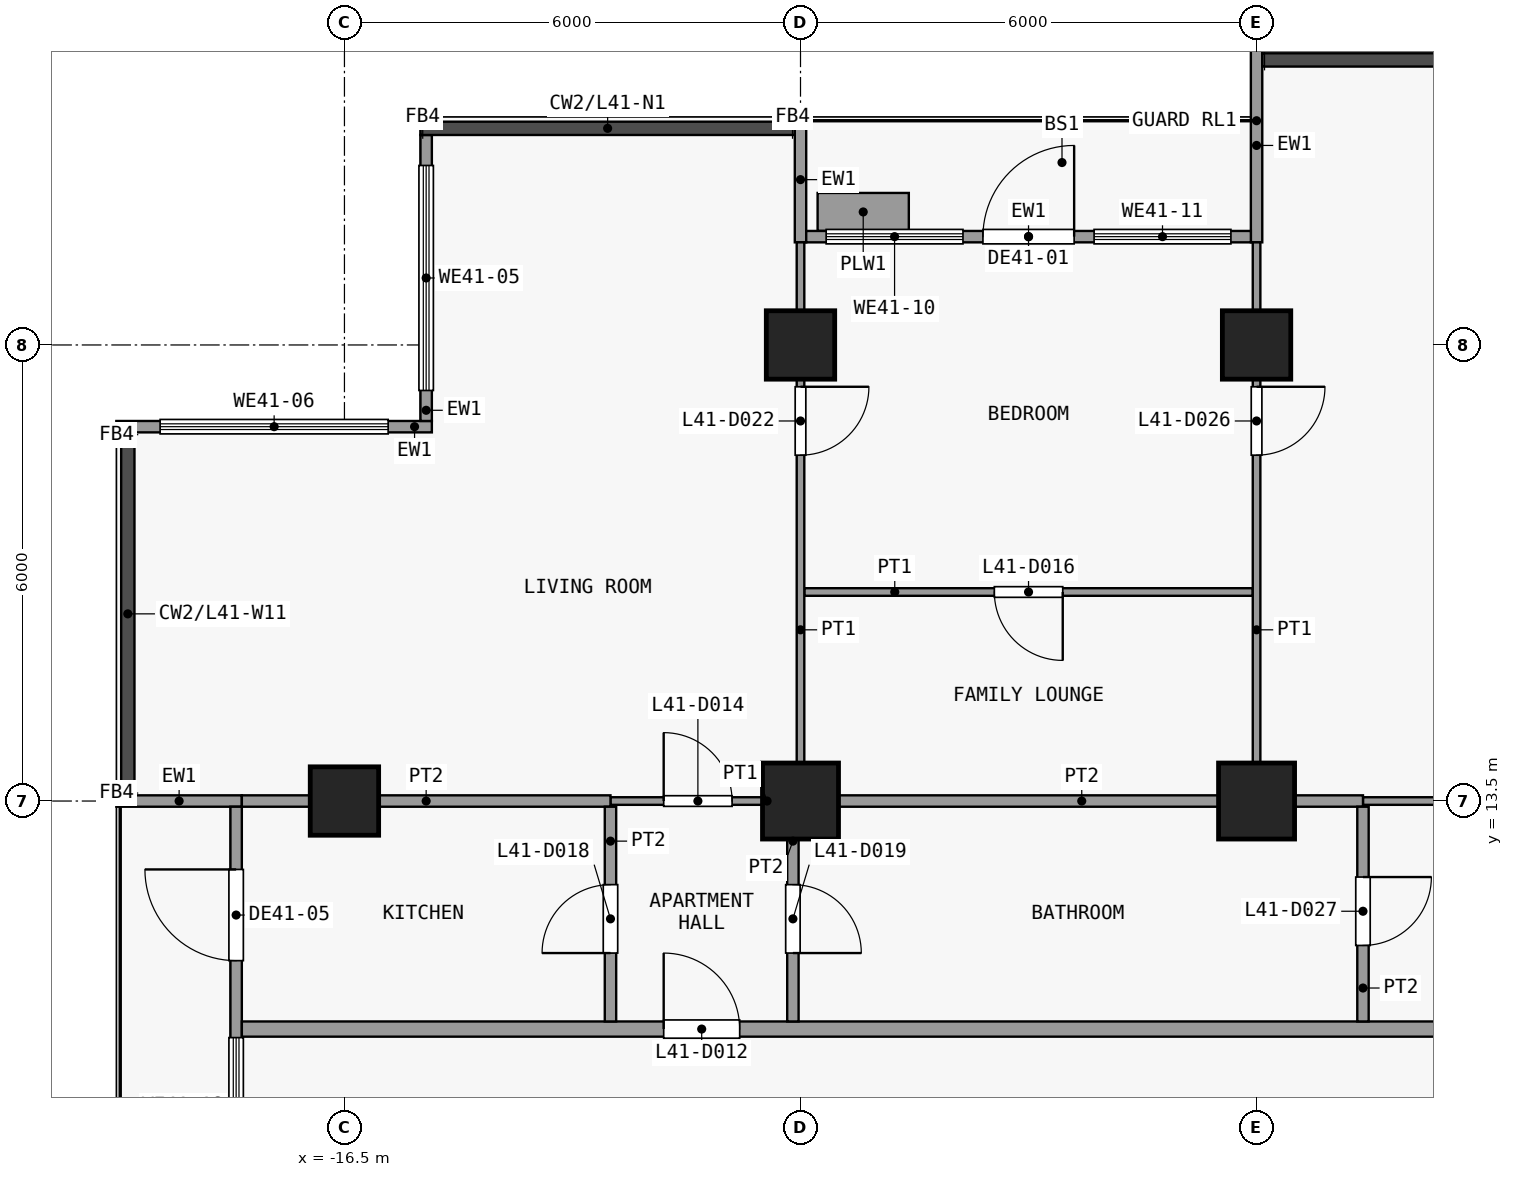
"""IFC4 building model, lengths in metres.
Left out: names, types, materials, properties, quantities, classifications, styles, units other than length and angle.
Written with IfcOpenShell. Run it as: python <this file> out.ifc"""

import sys

from ifc_helpers import new_model, si_unit, direction, frame, frame_2d, origin, origin_2d, place, context, subcontext, project, spatial, rectangle, extrude, element, fill, save


model = new_model("IFC4")
c1 = context("Model", 3, precision=1e-05, world=origin(), true_north=direction((0.0, 1.0)))
c2 = subcontext(c1, "Body", "Model", "MODEL_VIEW")
j1 = project(units=[si_unit("LENGTHUNIT", "METRE"), si_unit("PLANEANGLEUNIT", "RADIAN")], contexts=[c1])
p1 = place(None, origin())
s1 = spatial("IfcSite", under=j1, at=p1, CompositionType="ELEMENT")
p2 = place(p1, origin())
s2 = spatial("IfcBuilding", under=s1, at=p2, CompositionType="ELEMENT")
p3 = place(p2, frame((0.0, 0.0, 167.3)))
s3 = spatial("IfcBuildingStorey", under=s2, at=p3, CompositionType="ELEMENT", Elevation=167.3)
p4 = place(p3, frame((-16.5, 13.5, 0.0), z_axis=(0.0, 0.0, 1.0), x_axis=(1.0, 0.0, 0.0)))
e1 = element("IfcColumn", 1, at=p4, inside=s3, PredefinedType="COLUMN", context=c2, shape_type="SweptSolid", body=[
    extrude(rectangle(XDim=0.9, YDim=0.9, at=origin_2d()), origin(), (0.0, 0.0, 1.0), 3.6),
])
p5 = place(p3, frame((-10.5, 13.5, 0.0), z_axis=(0.0, 0.0, 1.0), x_axis=(1.0, 0.0, 0.0)))
e2 = element("IfcColumn", 2, at=p5, inside=s3, PredefinedType="COLUMN", context=c2, shape_type="SweptSolid", body=[
    extrude(rectangle(XDim=1.0, YDim=1.0, at=origin_2d()), origin(), (0.0, 0.0, 1.0), 3.6),
])
p6 = place(p3, frame((-10.5, 19.5, 0.0), z_axis=(0.0, 0.0, 1.0), x_axis=(1.0, 0.0, 0.0)))
e3 = element("IfcColumn", 3, at=p6, inside=s3, PredefinedType="COLUMN", context=c2, shape_type="SweptSolid", body=[
    extrude(rectangle(XDim=0.9, YDim=0.9, at=origin_2d()), origin(), (0.0, 0.0, 1.0), 3.6),
])
p7 = place(p3, frame((-4.5, 13.5, 0.0), z_axis=(0.0, 0.0, 1.0), x_axis=(1.0, 0.0, 0.0)))
e4 = element("IfcColumn", 4, at=p7, inside=s3, PredefinedType="COLUMN", context=c2, shape_type="SweptSolid", body=[
    extrude(rectangle(XDim=1.0, YDim=1.0, at=origin_2d()), origin(), (0.0, 0.0, 1.0), 3.6),
])
p8 = place(p3, frame((-4.5, 19.5, 0.0), z_axis=(0.0, 0.0, 1.0), x_axis=(1.0, 0.0, 0.0)))
e5 = element("IfcColumn", 5, at=p8, inside=s3, PredefinedType="COLUMN", context=c2, shape_type="SweptSolid", body=[
    extrude(rectangle(XDim=0.9, YDim=0.9, at=origin_2d()), origin(), (0.0, 0.0, 1.0), 3.6),
])
p9 = place(p3, frame((-15.425, 18.5, 0.0), z_axis=(0.0, 0.0, 1.0), x_axis=(0.0, 1.0, 0.0)))
e6 = element("IfcWall", 6, at=p9, inside=s3, PredefinedType="SOLIDWALL", context=c2, shape_type="SweptSolid", body=[
    extrude(rectangle(XDim=3.762, YDim=0.15, at=frame_2d((1.881, 0.0))), origin(), (0.0, 0.0, 1.0), 3.3),
])
p10 = place(p9, frame((0.401, 0.0, 0.9)))
e7 = element("IfcOpeningElement", 7, at=p10, cuts=e6, PredefinedType="OPENING", context=c2, shape_type="SweptSolid", body=[
    extrude(rectangle(XDim=2.96, YDim=2.4, at=frame_2d((1.48, 1.2))), frame((0.0, 0.085, 0.0), z_axis=(0.0, -1.0, 0.0), x_axis=(1.0, 0.0, 0.0)), (0.0, 0.0, 1.0), 0.17),
])
p11 = place(p3, frame((-19.5, 18.425, 0.0), z_axis=(0.0, 0.0, 1.0), x_axis=(1.0, 0.0, 0.0)))
e8 = element("IfcWall", 8, at=p11, inside=s3, PredefinedType="SOLIDWALL", context=c2, shape_type="SweptSolid", body=[
    extrude(rectangle(XDim=4.15, YDim=0.15, at=frame_2d((2.075, 0.0))), origin(), (0.0, 0.0, 1.0), 3.3),
])
p12 = place(p11, frame((0.575, 0.0, 0.9)))
e9 = element("IfcOpeningElement", 9, at=p12, cuts=e8, PredefinedType="OPENING", context=c2, shape_type="SweptSolid", body=[
    extrude(rectangle(XDim=3.0, YDim=2.4, at=frame_2d((1.5, 1.2))), frame((0.0, 0.085, 0.0), z_axis=(0.0, -1.0, 0.0), x_axis=(1.0, 0.0, 0.0)), (0.0, 0.0, 1.0), 0.17),
])
p13 = place(p3, frame((-10.5, 20.85, 0.0), z_axis=(0.0, 0.0, 1.0), x_axis=(0.0, 1.0, 0.0)))
e10 = element("IfcWall", 10, at=p13, inside=s3, PredefinedType="SOLIDWALL", context=c2, shape_type="SweptSolid", body=[
    extrude(rectangle(XDim=1.65, YDim=0.15, at=frame_2d((0.825, 0.0))), origin(), (0.0, 0.0, 1.0), 3.3),
])
p14 = place(p3, frame((-4.5, 20.85, 0.0), z_axis=(0.0, 0.0, 1.0), x_axis=(0.0, 1.0, 0.0)))
e11 = element("IfcWall", 11, at=p14, inside=s3, PredefinedType="SOLIDWALL", context=c2, shape_type="SweptSolid", body=[
    extrude(rectangle(XDim=2.55, YDim=0.15, at=frame_2d((1.275, 0.0))), origin(), (0.0, 0.0, 1.0), 3.3),
])
p15 = place(p3, frame((-10.425, 20.925, 0.0), z_axis=(0.0, 0.0, 1.0), x_axis=(1.0, 0.0, 0.0)))
e12 = element("IfcWall", 12, at=p15, inside=s3, PredefinedType="SOLIDWALL", context=c2, shape_type="SweptSolid", body=[
    extrude(rectangle(XDim=5.85, YDim=0.15, at=frame_2d((2.925, 0.0))), origin(), (0.0, 0.0, 1.0), 3.3),
])
p16 = place(p15, frame((2.325, 0.0, 0.0)))
e13 = element("IfcOpeningElement", 13, at=p16, cuts=e12, PredefinedType="OPENING", context=c2, shape_type="SweptSolid", body=[
    extrude(rectangle(XDim=1.2, YDim=2.4, at=frame_2d((0.6, 1.2))), frame((0.0, 0.085, 0.0), z_axis=(0.0, -1.0, 0.0), x_axis=(1.0, 0.0, 0.0)), (0.0, 0.0, 1.0), 0.17),
])
p17 = place(p15, frame((0.262, 0.0, 0.9)))
e14 = element("IfcOpeningElement", 14, at=p17, cuts=e12, PredefinedType="OPENING", context=c2, shape_type="SweptSolid", body=[
    extrude(rectangle(XDim=1.8, YDim=2.1, at=frame_2d((0.9, 1.05))), frame((0.0, 0.085, 0.0), z_axis=(0.0, -1.0, 0.0), x_axis=(1.0, 0.0, 0.0)), (0.0, 0.0, 1.0), 0.17),
])
p18 = place(p15, frame((3.788, 0.0, 0.9)))
e15 = element("IfcOpeningElement", 15, at=p18, cuts=e12, PredefinedType="OPENING", context=c2, shape_type="SweptSolid", body=[
    extrude(rectangle(XDim=1.8, YDim=2.1, at=frame_2d((0.9, 1.05))), frame((0.0, 0.085, 0.0), z_axis=(0.0, -1.0, 0.0), x_axis=(1.0, 0.0, 0.0)), (0.0, 0.0, 1.0), 0.17),
])
p19 = place(p3, frame((-10.275, 21.25, 0.0), z_axis=(0.0, 0.0, 1.0), x_axis=(1.0, 0.0, 0.0)))
e16 = element("IfcWall", 16, at=p19, inside=s3, PredefinedType="USERDEFINED", context=c2, shape_type="SweptSolid", body=[
    extrude(rectangle(XDim=1.2, YDim=0.5, at=frame_2d((0.6, 0.0))), origin(), (0.0, 0.0, 1.0), 0.9),
])
p20 = place(p3, frame((-17.85, 13.5, 0.0), z_axis=(0.0, 0.0, 1.0), x_axis=(-1.0, 0.0, 0.0)))
e17 = element("IfcWall", 17, at=p20, inside=s3, PredefinedType="SOLIDWALL", context=c2, shape_type="SweptSolid", body=[
    extrude(rectangle(XDim=1.65, YDim=0.15, at=frame_2d((0.825, 0.0))), origin(), (0.0, 0.0, 1.0), 3.3),
])
p21 = place(p3, frame((-17.925, 7.575, 0.0), z_axis=(0.0, 0.0, 1.0), x_axis=(0.0, 1.0, 0.0)))
e18 = element("IfcWall", 18, at=p21, inside=s3, PredefinedType="SOLIDWALL", context=c2, shape_type="SweptSolid", body=[
    extrude(rectangle(XDim=5.85, YDim=0.15, at=frame_2d((2.925, 0.0))), origin(), (0.0, 0.0, 1.0), 3.3),
])
p22 = place(p21, frame((3.825, 0.0, 0.0)))
e19 = element("IfcOpeningElement", 19, at=p22, cuts=e18, PredefinedType="OPENING", context=c2, shape_type="SweptSolid", body=[
    extrude(rectangle(XDim=1.2, YDim=2.4, at=frame_2d((0.6, 1.2))), frame((0.0, 0.085, 0.0), z_axis=(0.0, -1.0, 0.0), x_axis=(1.0, 0.0, 0.0)), (0.0, 0.0, 1.0), 0.17),
])
p23 = place(p21, frame((1.012, 0.0, 0.9)))
e20 = element("IfcOpeningElement", 20, at=p23, cuts=e18, PredefinedType="OPENING", context=c2, shape_type="SweptSolid", body=[
    extrude(rectangle(XDim=1.8, YDim=2.1, at=frame_2d((0.9, 1.05))), frame((0.0, 0.085, 0.0), z_axis=(0.0, -1.0, 0.0), x_axis=(1.0, 0.0, 0.0)), (0.0, 0.0, 1.0), 0.17),
])
p24 = place(p3, frame((-17.85, 10.5, 0.0), z_axis=(0.0, 0.0, 1.0), x_axis=(1.0, 0.0, 0.0)))
e21 = element("IfcWall", 21, at=p24, inside=s3, PredefinedType="PARTITIONING", context=c2, shape_type="SweptSolid", body=[
    extrude(rectangle(XDim=37.2, YDim=0.2, at=frame_2d((18.6, 0.0))), origin(), (0.0, 0.0, 1.0), 3.3),
])
p25 = place(p24, frame((5.55, 0.0, 0.0)))
e22 = element("IfcOpeningElement", 22, at=p25, cuts=e21, PredefinedType="OPENING", context=c2, shape_type="SweptSolid", body=[
    extrude(rectangle(XDim=1.0, YDim=2.1, at=frame_2d((0.5, 1.05))), frame((0.0, 0.11, 0.0), z_axis=(0.0, -1.0, 0.0), x_axis=(1.0, 0.0, 0.0)), (0.0, 0.0, 1.0), 0.22),
])
p26 = place(p24, frame((25.55, 0.0, 0.0)))
e23 = element("IfcOpeningElement", 23, at=p26, cuts=e21, PredefinedType="OPENING", context=c2, shape_type="SweptSolid", body=[
    extrude(rectangle(XDim=1.0, YDim=2.1, at=frame_2d((0.5, 1.05))), frame((0.0, 0.11, 0.0), z_axis=(0.0, -1.0, 0.0), x_axis=(1.0, 0.0, 0.0)), (0.0, 0.0, 1.0), 0.22),
])
p27 = place(p3, frame((-13.0, 13.5, 0.0), z_axis=(0.0, 0.0, 1.0), x_axis=(1.0, 0.0, 0.0)))
e24 = element("IfcWall", 24, at=p27, inside=s3, PredefinedType="PARTITIONING", context=c2, shape_type="SweptSolid", body=[
    extrude(rectangle(XDim=2.4, YDim=0.1, at=frame_2d((1.2, 0.0))), origin(), (0.0, 0.0, 1.0), 3.3),
])
p28 = place(p27, frame((0.7, 0.0, 0.0)))
e25 = element("IfcOpeningElement", 25, at=p28, cuts=e24, PredefinedType="OPENING", context=c2, shape_type="SweptSolid", body=[
    extrude(rectangle(XDim=0.9, YDim=2.1, at=frame_2d((0.45, 1.05))), frame((0.0, 0.06, 0.0), z_axis=(0.0, -1.0, 0.0), x_axis=(1.0, 0.0, 0.0)), (0.0, 0.0, 1.0), 0.12),
])
p29 = place(p3, frame((-3.1, 13.5, 0.0), z_axis=(0.0, 0.0, 1.0), x_axis=(1.0, 0.0, 0.0)))
e26 = element("IfcWall", 26, at=p29, inside=s3, PredefinedType="PARTITIONING", context=c2, shape_type="SweptSolid", body=[
    extrude(rectangle(XDim=7.6, YDim=0.1, at=frame_2d((3.8, 0.0))), origin(), (0.0, 0.0, 1.0), 3.3),
])
p30 = place(p3, frame((-17.85, 13.5, 0.0), z_axis=(0.0, 0.0, 1.0), x_axis=(1.0, 0.0, 0.0)))
e27 = element("IfcWall", 27, at=p30, inside=s3, PredefinedType="PARTITIONING", context=c2, shape_type="SweptSolid", body=[
    extrude(rectangle(XDim=4.85, YDim=0.15, at=frame_2d((2.425, 0.0))), origin(), (0.0, 0.0, 1.0), 3.3),
])
p31 = place(p3, frame((-10.5, 13.5, 0.0), z_axis=(0.0, 0.0, 1.0), x_axis=(1.0, 0.0, 0.0)))
e28 = element("IfcWall", 28, at=p31, inside=s3, PredefinedType="PARTITIONING", context=c2, shape_type="SweptSolid", body=[
    extrude(rectangle(XDim=7.4, YDim=0.15, at=frame_2d((3.7, 0.0))), origin(), (0.0, 0.0, 1.0), 3.3),
])
p32 = place(p3, frame((-10.45, 16.25, 0.0), z_axis=(0.0, 0.0, 1.0), x_axis=(1.0, 0.0, 0.0)))
e29 = element("IfcWall", 29, at=p32, inside=s3, PredefinedType="PARTITIONING", context=c2, shape_type="SweptSolid", body=[
    extrude(rectangle(XDim=5.9, YDim=0.1, at=frame_2d((2.95, 0.0))), origin(), (0.0, 0.0, 1.0), 3.3),
])
p33 = place(p32, frame((2.5, 0.0, 0.0)))
e30 = element("IfcOpeningElement", 30, at=p33, cuts=e29, PredefinedType="OPENING", context=c2, shape_type="SweptSolid", body=[
    extrude(rectangle(XDim=0.9, YDim=2.1, at=frame_2d((0.45, 1.05))), frame((0.0, 0.06, 0.0), z_axis=(0.0, -1.0, 0.0), x_axis=(1.0, 0.0, 0.0)), (0.0, 0.0, 1.0), 0.12),
])
p34 = place(p3, frame((-13.0, 10.6, 0.0), z_axis=(0.0, 0.0, 1.0), x_axis=(0.0, 1.0, 0.0)))
e31 = element("IfcWall", 31, at=p34, inside=s3, PredefinedType="PARTITIONING", context=c2, shape_type="SweptSolid", body=[
    extrude(rectangle(XDim=2.825, YDim=0.15, at=frame_2d((1.413, 0.0))), origin(), (0.0, 0.0, 1.0), 3.3),
])
p35 = place(p34, frame((0.9, 0.0, 0.0)))
e32 = element("IfcOpeningElement", 32, at=p35, cuts=e31, PredefinedType="OPENING", context=c2, shape_type="SweptSolid", body=[
    extrude(rectangle(XDim=0.9, YDim=2.1, at=frame_2d((0.45, 1.05))), frame((0.0, 0.085, 0.0), z_axis=(0.0, -1.0, 0.0), x_axis=(1.0, 0.0, 0.0)), (0.0, 0.0, 1.0), 0.17),
])
p36 = place(p3, frame((-10.6, 10.6, 0.0), z_axis=(0.0, 0.0, 1.0), x_axis=(0.0, 1.0, 0.0)))
e33 = element("IfcWall", 33, at=p36, inside=s3, PredefinedType="PARTITIONING", context=c2, shape_type="SweptSolid", body=[
    extrude(rectangle(XDim=2.825, YDim=0.15, at=frame_2d((1.413, 0.0))), origin(), (0.0, 0.0, 1.0), 3.3),
])
p37 = place(p36, frame((0.9, 0.0, 0.0)))
e34 = element("IfcOpeningElement", 34, at=p37, cuts=e33, PredefinedType="OPENING", context=c2, shape_type="SweptSolid", body=[
    extrude(rectangle(XDim=0.9, YDim=2.1, at=frame_2d((0.45, 1.05))), frame((0.0, 0.085, 0.0), z_axis=(0.0, -1.0, 0.0), x_axis=(1.0, 0.0, 0.0)), (0.0, 0.0, 1.0), 0.17),
])
p38 = place(p3, frame((-10.5, 13.575, 0.0), z_axis=(0.0, 0.0, 1.0), x_axis=(0.0, 1.0, 0.0)))
e35 = element("IfcWall", 35, at=p38, inside=s3, PredefinedType="PARTITIONING", context=c2, shape_type="SweptSolid", body=[
    extrude(rectangle(XDim=7.275, YDim=0.1, at=frame_2d((3.638, 0.0))), origin(), (0.0, 0.0, 1.0), 3.3),
])
p39 = place(p38, frame((4.475, 0.0, 0.0)))
e36 = element("IfcOpeningElement", 36, at=p39, cuts=e35, PredefinedType="OPENING", context=c2, shape_type="SweptSolid", body=[
    extrude(rectangle(XDim=0.9, YDim=2.1, at=frame_2d((0.45, 1.05))), frame((0.0, 0.06, 0.0), z_axis=(0.0, -1.0, 0.0), x_axis=(1.0, 0.0, 0.0)), (0.0, 0.0, 1.0), 0.12),
])
p40 = place(p3, frame((-4.5, 13.575, 0.0), z_axis=(0.0, 0.0, 1.0), x_axis=(0.0, 1.0, 0.0)))
e37 = element("IfcWall", 37, at=p40, inside=s3, PredefinedType="PARTITIONING", context=c2, shape_type="SweptSolid", body=[
    extrude(rectangle(XDim=7.275, YDim=0.1, at=frame_2d((3.638, 0.0))), origin(), (0.0, 0.0, 1.0), 3.3),
])
p41 = place(p40, frame((4.475, 0.0, 0.0)))
e38 = element("IfcOpeningElement", 38, at=p41, cuts=e37, PredefinedType="OPENING", context=c2, shape_type="SweptSolid", body=[
    extrude(rectangle(XDim=0.9, YDim=2.1, at=frame_2d((0.45, 1.05))), frame((0.0, 0.06, 0.0), z_axis=(0.0, -1.0, 0.0), x_axis=(1.0, 0.0, 0.0)), (0.0, 0.0, 1.0), 0.12),
])
p42 = place(p3, frame((-3.1, 10.6, 0.0), z_axis=(0.0, 0.0, 1.0), x_axis=(0.0, 1.0, 0.0)))
e39 = element("IfcWall", 39, at=p42, inside=s3, PredefinedType="PARTITIONING", context=c2, shape_type="SweptSolid", body=[
    extrude(rectangle(XDim=2.825, YDim=0.15, at=frame_2d((1.413, 0.0))), origin(), (0.0, 0.0, 1.0), 3.3),
])
p43 = place(p42, frame((1.0, 0.0, 0.0)))
e40 = element("IfcOpeningElement", 40, at=p43, cuts=e39, PredefinedType="OPENING", context=c2, shape_type="SweptSolid", body=[
    extrude(rectangle(XDim=0.9, YDim=2.1, at=frame_2d((0.45, 1.05))), frame((0.0, 0.085, 0.0), z_axis=(0.0, -1.0, 0.0), x_axis=(1.0, 0.0, 0.0)), (0.0, 0.0, 1.0), 0.17),
])
p44 = place(p10, origin())
e41 = element("IfcWindow", 41, at=p44, inside=s3, PartitioningType="SINGLE_PANEL", PredefinedType="WINDOW", context=c2, shape_type="SweptSolid", body=[
    extrude(rectangle(XDim=2.96, YDim=2.4, at=frame_2d((1.48, 1.2))), frame((0.0, 0.03, 0.0), z_axis=(0.0, -1.0, 0.0), x_axis=(1.0, 0.0, 0.0)), (0.0, 0.0, 1.0), 0.06),
])
fill(e7, e41)
p45 = place(p12, origin())
e42 = element("IfcWindow", 42, at=p45, inside=s3, PartitioningType="SINGLE_PANEL", PredefinedType="WINDOW", context=c2, shape_type="SweptSolid", body=[
    extrude(rectangle(XDim=3.0, YDim=2.4, at=frame_2d((1.5, 1.2))), frame((0.0, 0.03, 0.0), z_axis=(0.0, -1.0, 0.0), x_axis=(1.0, 0.0, 0.0)), (0.0, 0.0, 1.0), 0.06),
])
fill(e9, e42)
p46 = place(p16, origin())
e43 = element("IfcDoor", 43, at=p46, inside=s3, OperationType="SINGLE_SWING_RIGHT", PredefinedType="DOOR", context=c2, shape_type="SweptSolid", body=[
    extrude(rectangle(XDim=1.2, YDim=2.4, at=frame_2d((0.6, 1.2))), frame((0.0, 0.025, 0.0), z_axis=(0.0, -1.0, 0.0), x_axis=(1.0, 0.0, 0.0)), (0.0, 0.0, 1.0), 0.05),
])
fill(e13, e43)
p47 = place(p17, origin())
e44 = element("IfcWindow", 44, at=p47, inside=s3, PartitioningType="SINGLE_PANEL", PredefinedType="WINDOW", context=c2, shape_type="SweptSolid", body=[
    extrude(rectangle(XDim=1.8, YDim=2.1, at=frame_2d((0.9, 1.05))), frame((0.0, 0.03, 0.0), z_axis=(0.0, -1.0, 0.0), x_axis=(1.0, 0.0, 0.0)), (0.0, 0.0, 1.0), 0.06),
])
fill(e14, e44)
p48 = place(p18, origin())
e45 = element("IfcWindow", 45, at=p48, inside=s3, PartitioningType="SINGLE_PANEL", PredefinedType="WINDOW", context=c2, shape_type="SweptSolid", body=[
    extrude(rectangle(XDim=1.8, YDim=2.1, at=frame_2d((0.9, 1.05))), frame((0.0, 0.03, 0.0), z_axis=(0.0, -1.0, 0.0), x_axis=(1.0, 0.0, 0.0)), (0.0, 0.0, 1.0), 0.06),
])
fill(e15, e45)
p49 = place(p22, origin())
e46 = element("IfcDoor", 46, at=p49, inside=s3, OperationType="SINGLE_SWING_RIGHT", PredefinedType="DOOR", context=c2, shape_type="SweptSolid", body=[
    extrude(rectangle(XDim=1.2, YDim=2.4, at=frame_2d((0.6, 1.2))), frame((0.0, 0.025, 0.0), z_axis=(0.0, -1.0, 0.0), x_axis=(1.0, 0.0, 0.0)), (0.0, 0.0, 1.0), 0.05),
])
fill(e19, e46)
p50 = place(p23, origin())
e47 = element("IfcWindow", 47, at=p50, inside=s3, PartitioningType="SINGLE_PANEL", PredefinedType="WINDOW", context=c2, shape_type="SweptSolid", body=[
    extrude(rectangle(XDim=1.8, YDim=2.1, at=frame_2d((0.9, 1.05))), frame((0.0, 0.03, 0.0), z_axis=(0.0, -1.0, 0.0), x_axis=(1.0, 0.0, 0.0)), (0.0, 0.0, 1.0), 0.06),
])
fill(e20, e47)
p51 = place(p25, origin())
e48 = element("IfcDoor", 48, at=p51, inside=s3, OperationType="SINGLE_SWING_RIGHT", PredefinedType="DOOR", context=c2, shape_type="SweptSolid", body=[
    extrude(rectangle(XDim=1.0, YDim=2.1, at=frame_2d((0.5, 1.05))), frame((0.0, 0.025, 0.0), z_axis=(0.0, -1.0, 0.0), x_axis=(1.0, 0.0, 0.0)), (0.0, 0.0, 1.0), 0.05),
])
fill(e22, e48)
p52 = place(p28, origin())
e49 = element("IfcDoor", 49, at=p52, inside=s3, OperationType="SINGLE_SWING_RIGHT", PredefinedType="DOOR", context=c2, shape_type="SweptSolid", body=[
    extrude(rectangle(XDim=0.9, YDim=2.1, at=frame_2d((0.45, 1.05))), frame((0.0, 0.025, 0.0), z_axis=(0.0, -1.0, 0.0), x_axis=(1.0, 0.0, 0.0)), (0.0, 0.0, 1.0), 0.05),
])
fill(e25, e49)
p53 = place(p33, origin())
e50 = element("IfcDoor", 50, at=p53, inside=s3, OperationType="SINGLE_SWING_RIGHT", PredefinedType="DOOR", context=c2, shape_type="SweptSolid", body=[
    extrude(rectangle(XDim=0.9, YDim=2.1, at=frame_2d((0.45, 1.05))), frame((0.0, 0.025, 0.0), z_axis=(0.0, -1.0, 0.0), x_axis=(1.0, 0.0, 0.0)), (0.0, 0.0, 1.0), 0.05),
])
fill(e30, e50)
p54 = place(p35, origin())
e51 = element("IfcDoor", 51, at=p54, inside=s3, OperationType="SINGLE_SWING_RIGHT", PredefinedType="DOOR", context=c2, shape_type="SweptSolid", body=[
    extrude(rectangle(XDim=0.9, YDim=2.1, at=frame_2d((0.45, 1.05))), frame((0.0, 0.025, 0.0), z_axis=(0.0, -1.0, 0.0), x_axis=(1.0, 0.0, 0.0)), (0.0, 0.0, 1.0), 0.05),
])
fill(e32, e51)
p55 = place(p37, origin())
e52 = element("IfcDoor", 52, at=p55, inside=s3, OperationType="SINGLE_SWING_LEFT", PredefinedType="DOOR", context=c2, shape_type="SweptSolid", body=[
    extrude(rectangle(XDim=0.9, YDim=2.1, at=frame_2d((0.45, 1.05))), frame((0.0, 0.025, 0.0), z_axis=(0.0, -1.0, 0.0), x_axis=(1.0, 0.0, 0.0)), (0.0, 0.0, 1.0), 0.05),
])
fill(e34, e52)
p56 = place(p39, origin())
e53 = element("IfcDoor", 53, at=p56, inside=s3, OperationType="SINGLE_SWING_RIGHT", PredefinedType="DOOR", context=c2, shape_type="SweptSolid", body=[
    extrude(rectangle(XDim=0.9, YDim=2.1, at=frame_2d((0.45, 1.05))), frame((0.0, 0.025, 0.0), z_axis=(0.0, -1.0, 0.0), x_axis=(1.0, 0.0, 0.0)), (0.0, 0.0, 1.0), 0.05),
])
fill(e36, e53)
p57 = place(p41, origin())
e54 = element("IfcDoor", 54, at=p57, inside=s3, OperationType="SINGLE_SWING_RIGHT", PredefinedType="DOOR", context=c2, shape_type="SweptSolid", body=[
    extrude(rectangle(XDim=0.9, YDim=2.1, at=frame_2d((0.45, 1.05))), frame((0.0, 0.025, 0.0), z_axis=(0.0, -1.0, 0.0), x_axis=(1.0, 0.0, 0.0)), (0.0, 0.0, 1.0), 0.05),
])
fill(e38, e54)
p58 = place(p43, origin())
e55 = element("IfcDoor", 55, at=p58, inside=s3, OperationType="SINGLE_SWING_RIGHT", PredefinedType="DOOR", context=c2, shape_type="SweptSolid", body=[
    extrude(rectangle(XDim=0.9, YDim=2.1, at=frame_2d((0.45, 1.05))), frame((0.0, 0.025, 0.0), z_axis=(0.0, -1.0, 0.0), x_axis=(1.0, 0.0, 0.0)), (0.0, 0.0, 1.0), 0.05),
])
fill(e40, e55)
save(model, sys.argv[1])
